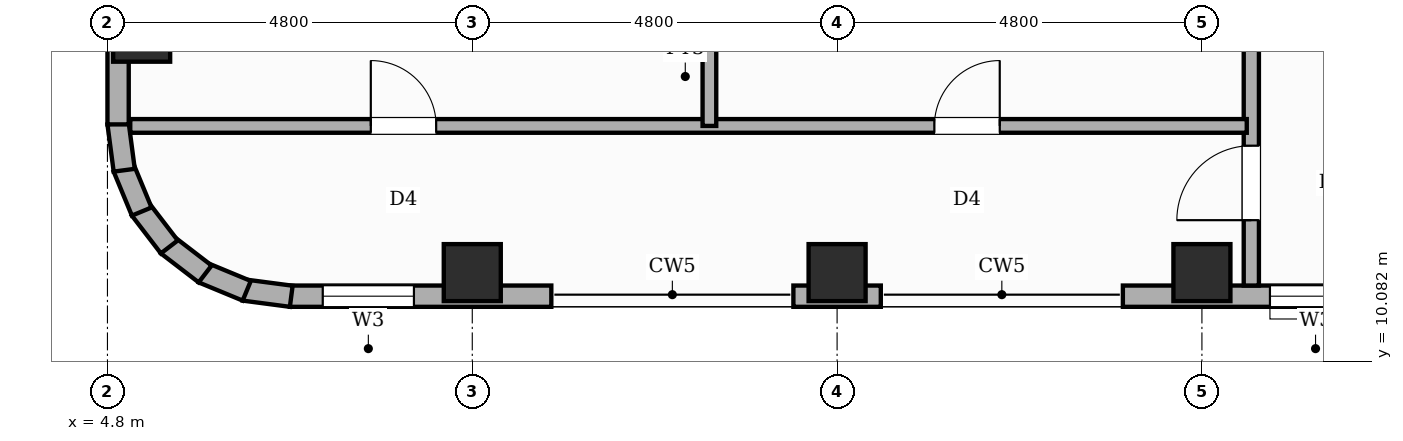
"""IFC4 building model, lengths in metres.
Left out: names, types, materials, properties, quantities, classifications, styles, units other than length and angle.
Written with IfcOpenShell. Run it as: python <this file> out.ifc"""

import sys

from ifc_helpers import new_model, si_unit, direction, frame, frame_2d, origin, origin_2d, place, context, subcontext, project, spatial, rectangle, extrude, element, fill, save


model = new_model("IFC4")
c1 = context("Model", 3, precision=1e-05, world=origin(), true_north=direction((0.0, 1.0)))
c2 = subcontext(c1, "Body", "Model", "MODEL_VIEW")
j1 = project(units=[si_unit("LENGTHUNIT", "METRE"), si_unit("PLANEANGLEUNIT", "RADIAN")], contexts=[c1])
p1 = place(None, origin())
s1 = spatial("IfcSite", under=j1, at=p1, CompositionType="ELEMENT")
p2 = place(p1, origin())
s2 = spatial("IfcBuilding", under=s1, at=p2, CompositionType="ELEMENT")
p3 = place(p2, frame((0.0, 0.0, 278.5)))
s3 = spatial("IfcBuildingStorey", under=s2, at=p3, CompositionType="ELEMENT", Elevation=278.5)
for number, where, z_axis, x_axis in (
    (1, (5.25, 14.4, 0.0), (0.0, 0.0, 1.0), (1.0, 0.0, 0.0)),
    (2, (9.6, 11.25, 0.0), (0.0, 0.0, 1.0), (1.0, 0.0, 0.0)),
    (3, (14.4, 11.25, 0.0), (0.0, 0.0, 1.0), (1.0, 0.0, 0.0)),
    (4, (19.2, 11.25, 0.0), (0.0, 0.0, 1.0), (1.0, 0.0, 0.0)),
):
    element("IfcColumn", number, at=place(p3, frame(where, z_axis=z_axis, x_axis=x_axis)), inside=s3, PredefinedType="COLUMN", context=c2, shape_type="SweptSolid", body=[
        extrude(rectangle(XDim=0.75, YDim=0.75, at=origin_2d()), origin(), (0.0, 0.0, 1.0), 4.3),
    ])
p4 = place(p3, frame((21.6, 10.94, 0.0), z_axis=(0.0, 0.0, 1.0), x_axis=(-1.0, 0.0, 0.0)))
e5 = element("IfcWall", 5, at=p4, inside=s3, PredefinedType="STANDARD", context=c2, shape_type="SweptSolid", body=[
    extrude(rectangle(XDim=3.44, YDim=0.28, at=frame_2d((1.72, 0.0))), origin(), (0.0, 0.0, 1.0), 3.32),
])
p5 = place(p4, frame((0.305, 0.0, 0.8)))
e6 = element("IfcOpeningElement", 6, at=p5, cuts=e5, PredefinedType="OPENING", context=c2, shape_type="SweptSolid", body=[
    extrude(rectangle(XDim=1.2, YDim=1.8, at=frame_2d((0.6, 0.9))), frame((0.0, 0.15, 0.0), z_axis=(0.0, -1.0, 0.0), x_axis=(1.0, 0.0, 0.0)), (0.0, 0.0, 1.0), 0.3),
])
p6 = place(p3, frame((14.975, 10.94, 0.0), z_axis=(0.0, 0.0, 1.0), x_axis=(-1.0, 0.0, 0.0)))
e7 = element("IfcWall", 7, at=p6, inside=s3, PredefinedType="STANDARD", context=c2, shape_type="SweptSolid", body=[
    extrude(rectangle(XDim=1.15, YDim=0.28, at=frame_2d((0.575, 0.0))), origin(), (0.0, 0.0, 1.0), 3.32),
])
p7 = place(p3, frame((10.64, 10.94, 0.0), z_axis=(0.0, 0.0, 1.0), x_axis=(-1.0, 0.0, 0.0)))
e8 = element("IfcWall", 8, at=p7, inside=s3, PredefinedType="STANDARD", context=c2, shape_type="SweptSolid", body=[
    extrude(rectangle(XDim=3.44, YDim=0.28, at=frame_2d((1.72, 0.0))), origin(), (0.0, 0.0, 1.0), 3.32),
])
p8 = place(p7, frame((1.808, 0.0, 0.8)))
e9 = element("IfcOpeningElement", 9, at=p8, cuts=e8, PredefinedType="OPENING", context=c2, shape_type="SweptSolid", body=[
    extrude(rectangle(XDim=1.2, YDim=1.8, at=frame_2d((0.6, 0.9))), frame((0.0, 0.15, 0.0), z_axis=(0.0, -1.0, 0.0), x_axis=(1.0, 0.0, 0.0)), (0.0, 0.0, 1.0), 0.3),
])
p9 = place(p3, frame((7.218, 10.939, 0.0), z_axis=(0.0, 0.0, 1.0), x_axis=(-0.9914410257, 0.130555323746, 0.0)))
e10 = element("IfcWall", 10, at=p9, inside=s3, PredefinedType="STANDARD", context=c2, shape_type="SweptSolid", body=[
    extrude(rectangle(XDim=0.626, YDim=0.28, at=frame_2d((0.313, 0.0))), origin(), (0.0, 0.0, 1.0), 4.04),
])
p10 = place(p3, frame((6.632, 11.011, 0.0), z_axis=(0.0, 0.0, 1.0), x_axis=(-0.923836271867, 0.382787856107, 0.0)))
e11 = element("IfcWall", 11, at=p10, inside=s3, PredefinedType="STANDARD", context=c2, shape_type="SweptSolid", body=[
    extrude(rectangle(XDim=0.626, YDim=0.28, at=frame_2d((0.313, 0.0))), origin(), (0.0, 0.0, 1.0), 4.04),
])
for number, where, z_axis, x_axis in (
    (12, (6.085, 11.233, 0.0), (0.0, 0.0, 1.0), (-0.793, 0.609, 0.0)),
    (13, (5.614, 11.588, 0.0), (0.0, 0.0, 1.0), (-0.609, 0.793, 0.0)),
):
    element("IfcWall", number, at=place(p3, frame(where, z_axis=z_axis, x_axis=x_axis)), inside=s3, PredefinedType="STANDARD", context=c2, shape_type="SweptSolid", body=[
        extrude(rectangle(XDim=0.626, YDim=0.28, at=frame_2d((0.313, 0.0))), origin(), (0.0, 0.0, 1.0), 4.04),
    ])
p11 = place(p3, frame((5.251, 12.054, 0.0), z_axis=(0.0, 0.0, 1.0), x_axis=(-0.382787856107, 0.923836271867, 0.0)))
e14 = element("IfcWall", 14, at=p11, inside=s3, PredefinedType="STANDARD", context=c2, shape_type="SweptSolid", body=[
    extrude(rectangle(XDim=0.626, YDim=0.28, at=frame_2d((0.313, 0.0))), origin(), (0.0, 0.0, 1.0), 4.04),
])
p12 = place(p3, frame((5.021, 12.597, 0.0), z_axis=(0.0, 0.0, 1.0), x_axis=(-0.130555323746, 0.9914410257, 0.0)))
e15 = element("IfcWall", 15, at=p12, inside=s3, PredefinedType="STANDARD", context=c2, shape_type="SweptSolid", body=[
    extrude(rectangle(XDim=0.626, YDim=0.28, at=frame_2d((0.313, 0.0))), origin(), (0.0, 0.0, 1.0), 4.04),
])
p13 = place(p3, frame((4.94, 13.2, 0.0), z_axis=(0.0, 0.0, 1.0), x_axis=(0.0, 1.0, 0.0)))
e16 = element("IfcWall", 16, at=p13, inside=s3, PredefinedType="STANDARD", context=c2, shape_type="SweptSolid", body=[
    extrude(rectangle(XDim=32.4, YDim=0.28, at=frame_2d((16.2, 0.0))), origin(), (0.0, 0.0, 1.0), 3.32),
])
p14 = place(p13, frame((8.1, 0.0, 0.0)))
e17 = element("IfcOpeningElement", 17, at=p14, cuts=e16, PredefinedType="OPENING", context=c2, shape_type="SweptSolid", body=[
    extrude(rectangle(XDim=1.1, YDim=2.15, at=frame_2d((0.55, 1.075))), frame((0.0, 0.15, 0.0), z_axis=(0.0, -1.0, 0.0), x_axis=(1.0, 0.0, 0.0)), (0.0, 0.0, 1.0), 0.3),
])
p15 = place(p13, frame((1.798, 0.0, 0.45)))
e18 = element("IfcOpeningElement", 18, at=p15, cuts=e16, PredefinedType="OPENING", context=c2, shape_type="SweptSolid", body=[
    extrude(rectangle(XDim=0.6, YDim=1.8, at=frame_2d((0.3, 0.9))), frame((0.0, 0.15, 0.0), z_axis=(0.0, -1.0, 0.0), x_axis=(1.0, 0.0, 0.0)), (0.0, 0.0, 1.0), 0.3),
])
p16 = place(p13, frame((3.077, 0.0, 0.8)))
e19 = element("IfcOpeningElement", 19, at=p16, cuts=e16, PredefinedType="OPENING", context=c2, shape_type="SweptSolid", body=[
    extrude(rectangle(XDim=2.05, YDim=1.95, at=frame_2d((1.025, 0.975))), frame((0.0, 0.15, 0.0), z_axis=(0.0, -1.0, 0.0), x_axis=(1.0, 0.0, 0.0)), (0.0, 0.0, 1.0), 0.3),
])
p17 = place(p13, frame((13.083, 0.0, 0.8)))
e20 = element("IfcOpeningElement", 20, at=p17, cuts=e16, PredefinedType="OPENING", context=c2, shape_type="SweptSolid", body=[
    extrude(rectangle(XDim=2.05, YDim=1.95, at=frame_2d((1.025, 0.975))), frame((0.0, 0.15, 0.0), z_axis=(0.0, -1.0, 0.0), x_axis=(1.0, 0.0, 0.0)), (0.0, 0.0, 1.0), 0.3),
])
p18 = place(p13, frame((11.492, 0.0, 0.45)))
e21 = element("IfcOpeningElement", 21, at=p18, cuts=e16, PredefinedType="OPENING", context=c2, shape_type="SweptSolid", body=[
    extrude(rectangle(XDim=0.75, YDim=1.8, at=frame_2d((0.375, 0.9))), frame((0.0, 0.15, 0.0), z_axis=(0.0, -1.0, 0.0), x_axis=(1.0, 0.0, 0.0)), (0.0, 0.0, 1.0), 0.3),
])
p19 = place(p3, frame((19.85, 11.08, 0.0), z_axis=(0.0, 0.0, 1.0), x_axis=(0.0, 1.0, 0.0)))
e22 = element("IfcWall", 22, at=p19, inside=s3, PredefinedType="PARTITIONING", context=c2, shape_type="SweptSolid", body=[
    extrude(rectangle(XDim=12.32, YDim=0.2, at=frame_2d((6.16, 0.0))), origin(), (0.0, 0.0, 1.0), 4.04),
])
p20 = place(p19, frame((0.86, 0.0, 0.0)))
e23 = element("IfcOpeningElement", 23, at=p20, cuts=e22, PredefinedType="OPENING", context=c2, shape_type="SweptSolid", body=[
    extrude(rectangle(XDim=0.98, YDim=2.18, at=frame_2d((0.49, 1.09))), frame((0.0, 0.11, 0.0), z_axis=(0.0, -1.0, 0.0), x_axis=(1.0, 0.0, 0.0)), (0.0, 0.0, 1.0), 0.22),
])
p21 = place(p19, frame((6.88, 0.0, 0.0)))
e24 = element("IfcOpeningElement", 24, at=p21, cuts=e22, PredefinedType="OPENING", context=c2, shape_type="SweptSolid", body=[
    extrude(rectangle(XDim=0.98, YDim=2.18, at=frame_2d((0.49, 1.09))), frame((0.0, 0.11, 0.0), z_axis=(0.0, -1.0, 0.0), x_axis=(1.0, 0.0, 0.0)), (0.0, 0.0, 1.0), 0.22),
])
p22 = place(p3, frame((5.1, 13.18, 0.0), z_axis=(0.0, 0.0, 1.0), x_axis=(1.0, 0.0, 0.0)))
e25 = element("IfcWall", 25, at=p22, inside=s3, PredefinedType="PLUMBINGWALL", context=c2, shape_type="SweptSolid", body=[
    extrude(rectangle(XDim=14.69, YDim=0.18, at=frame_2d((7.345, 0.0))), origin(), (0.0, 0.0, 1.0), 4.04),
])
p23 = place(p22, frame((3.165, 0.0, 0.0)))
e26 = element("IfcOpeningElement", 26, at=p23, cuts=e25, PredefinedType="OPENING", context=c2, shape_type="SweptSolid", body=[
    extrude(rectangle(XDim=0.86, YDim=2.1, at=frame_2d((0.43, 1.05))), frame((0.0, 0.1, 0.0), z_axis=(0.0, -1.0, 0.0), x_axis=(1.0, 0.0, 0.0)), (0.0, 0.0, 1.0), 0.2),
])
p24 = place(p22, frame((10.58, 0.0, 0.0)))
e27 = element("IfcOpeningElement", 27, at=p24, cuts=e25, PredefinedType="OPENING", context=c2, shape_type="SweptSolid", body=[
    extrude(rectangle(XDim=0.86, YDim=2.1, at=frame_2d((0.43, 1.05))), frame((0.0, 0.1, 0.0), z_axis=(0.0, -1.0, 0.0), x_axis=(1.0, 0.0, 0.0)), (0.0, 0.0, 1.0), 0.2),
])
p25 = place(p3, frame((12.72, 13.18, 0.0), z_axis=(0.0, 0.0, 1.0), x_axis=(0.0, 1.0, 0.0)))
e28 = element("IfcWall", 28, at=p25, inside=s3, PredefinedType="PLUMBINGWALL", context=c2, shape_type="SweptSolid", body=[
    extrude(rectangle(XDim=2.66, YDim=0.18, at=frame_2d((1.33, 0.0))), origin(), (0.0, 0.0, 1.0), 4.04),
])
p26 = place(p5, origin())
e29 = element("IfcWindow", 29, at=p26, inside=s3, PartitioningType="SINGLE_PANEL", PredefinedType="WINDOW", context=c2, shape_type="SweptSolid", body=[
    extrude(rectangle(XDim=1.2, YDim=1.8, at=frame_2d((0.6, 0.9))), frame((0.0, 0.03, 0.0), z_axis=(0.0, -1.0, 0.0), x_axis=(1.0, 0.0, 0.0)), (0.0, 0.0, 1.0), 0.06),
])
fill(e6, e29)
p27 = place(p8, origin())
e30 = element("IfcWindow", 30, at=p27, inside=s3, PartitioningType="SINGLE_PANEL", PredefinedType="WINDOW", context=c2, shape_type="SweptSolid", body=[
    extrude(rectangle(XDim=1.2, YDim=1.8, at=frame_2d((0.6, 0.9))), frame((0.0, 0.03, 0.0), z_axis=(0.0, -1.0, 0.0), x_axis=(1.0, 0.0, 0.0)), (0.0, 0.0, 1.0), 0.06),
])
fill(e9, e30)
p28 = place(p20, origin())
e31 = element("IfcDoor", 31, at=p28, inside=s3, OperationType="SINGLE_SWING_LEFT", PredefinedType="DOOR", context=c2, shape_type="SweptSolid", body=[
    extrude(rectangle(XDim=0.98, YDim=2.18, at=frame_2d((0.49, 1.09))), frame((0.0, 0.025, 0.0), z_axis=(0.0, -1.0, 0.0), x_axis=(1.0, 0.0, 0.0)), (0.0, 0.0, 1.0), 0.05),
])
fill(e23, e31)
p29 = place(p23, origin())
e32 = element("IfcDoor", 32, at=p29, inside=s3, OperationType="SINGLE_SWING_LEFT", PredefinedType="DOOR", context=c2, shape_type="SweptSolid", body=[
    extrude(rectangle(XDim=0.86, YDim=2.1, at=frame_2d((0.43, 1.05))), frame((0.0, 0.025, 0.0), z_axis=(0.0, -1.0, 0.0), x_axis=(1.0, 0.0, 0.0)), (0.0, 0.0, 1.0), 0.05),
])
fill(e26, e32)
p30 = place(p24, origin())
e33 = element("IfcDoor", 33, at=p30, inside=s3, OperationType="SINGLE_SWING_RIGHT", PredefinedType="DOOR", context=c2, shape_type="SweptSolid", body=[
    extrude(rectangle(XDim=0.86, YDim=2.1, at=frame_2d((0.43, 1.05))), frame((0.0, 0.025, 0.0), z_axis=(0.0, -1.0, 0.0), x_axis=(1.0, 0.0, 0.0)), (0.0, 0.0, 1.0), 0.05),
])
fill(e27, e33)
save(model, sys.argv[1])
